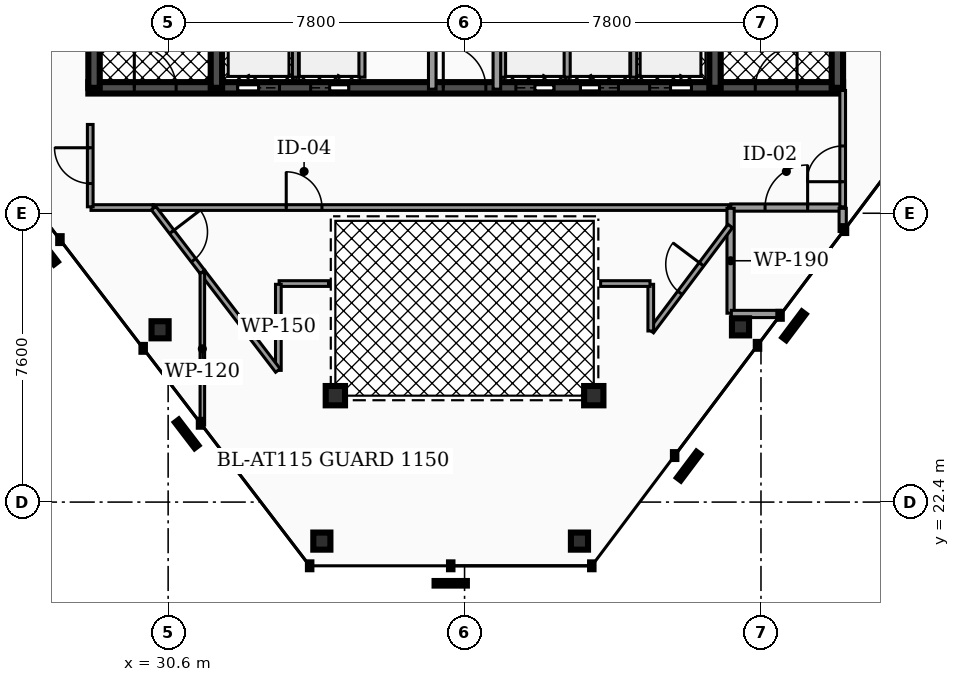
"""IFC4 building model, lengths in metres.
Left out: names, types, materials, properties, quantities, classifications, styles, units other than length and angle.
Written with IfcOpenShell. Run it as: python <this file> out.ifc"""

import sys

from ifc_helpers import new_model, si_unit, direction, frame, frame_2d, origin, origin_2d, place, context, subcontext, project, spatial, rectangle, hollow_rectangle, hollow_circle, extrude, element, fill, save


model = new_model("IFC4")
c1 = context("Model", 3, precision=1e-05, world=origin(), true_north=direction((0.0, 1.0)))
c2 = subcontext(c1, "Body", "Model", "MODEL_VIEW")
j1 = project(units=[si_unit("LENGTHUNIT", "METRE"), si_unit("PLANEANGLEUNIT", "RADIAN")], contexts=[c1])
p1 = place(None, origin())
s1 = spatial("IfcSite", under=j1, at=p1, CompositionType="ELEMENT")
p2 = place(p1, origin())
s2 = spatial("IfcBuilding", under=s1, at=p2, CompositionType="ELEMENT")
p3 = place(p2, frame((0.0, 0.0, 299.2)))
s3 = spatial("IfcBuildingStorey", under=s2, at=p3, CompositionType="ELEMENT", Elevation=299.2)
p4 = place(p3, frame((28.5, 33.3, 0.0), z_axis=(0.0, 0.0, 1.0), x_axis=(1.0, 0.0, 0.0)))
e1 = element("IfcWall", 1, at=p4, inside=s3, PredefinedType="SHEAR", context=c2, shape_type="SweptSolid", body=[
    extrude(rectangle(XDim=19.86, YDim=0.3, at=frame_2d((9.93, 0.0))), origin(), (0.0, 0.0, 1.0), 3.78),
])
p5 = place(p4, frame((3.93, 0.0, 0.0)))
e2 = element("IfcOpeningElement", 2, at=p5, cuts=e1, PredefinedType="OPENING", context=c2, shape_type="SweptSolid", body=[
    extrude(rectangle(XDim=1.1, YDim=2.15, at=frame_2d((0.55, 1.075))), frame((0.0, 0.16, 0.0), z_axis=(0.0, -1.0, 0.0), x_axis=(1.0, 0.0, 0.0)), (0.0, 0.0, 1.0), 0.32),
])
p6 = place(p4, frame((14.77, 0.0, 0.0)))
e3 = element("IfcOpeningElement", 3, at=p6, cuts=e1, PredefinedType="OPENING", context=c2, shape_type="SweptSolid", body=[
    extrude(rectangle(XDim=1.1, YDim=2.15, at=frame_2d((0.55, 1.075))), frame((0.0, 0.16, 0.0), z_axis=(0.0, -1.0, 0.0), x_axis=(1.0, 0.0, 0.0)), (0.0, 0.0, 1.0), 0.32),
])
p7 = place(p4, frame((11.25, 0.0, 0.0)))
e4 = element("IfcOpeningElement", 4, at=p7, cuts=e1, PredefinedType="OPENING", context=c2, shape_type="SweptSolid", body=[
    extrude(rectangle(XDim=1.0, YDim=2.1, at=frame_2d((0.5, 1.05))), frame((0.0, 0.16, 0.0), z_axis=(0.0, -1.0, 0.0), x_axis=(1.0, 0.0, 0.0)), (0.0, 0.0, 1.0), 0.32),
])
p8 = place(p4, frame((12.95, 0.0, 0.0)))
e5 = element("IfcOpeningElement", 5, at=p8, cuts=e1, PredefinedType="OPENING", context=c2, shape_type="SweptSolid", body=[
    extrude(rectangle(XDim=1.0, YDim=2.1, at=frame_2d((0.5, 1.05))), frame((0.0, 0.16, 0.0), z_axis=(0.0, -1.0, 0.0), x_axis=(1.0, 0.0, 0.0)), (0.0, 0.0, 1.0), 0.32),
])
p9 = place(p4, frame((5.85, 0.0, 0.0)))
e6 = element("IfcOpeningElement", 6, at=p9, cuts=e1, PredefinedType="OPENING", context=c2, shape_type="SweptSolid", body=[
    extrude(rectangle(XDim=1.0, YDim=2.1, at=frame_2d((0.5, 1.05))), frame((0.0, 0.16, 0.0), z_axis=(0.0, -1.0, 0.0), x_axis=(1.0, 0.0, 0.0)), (0.0, 0.0, 1.0), 0.32),
])
p10 = place(p4, frame((1.21, 0.0, 0.0)))
e7 = element("IfcOpeningElement", 7, at=p10, cuts=e1, PredefinedType="OPENING", context=c2, shape_type="SweptSolid", body=[
    extrude(rectangle(XDim=1.1, YDim=2.2, at=frame_2d((0.55, 1.1))), frame((0.0, 0.16, 0.0), z_axis=(0.0, -1.0, 0.0), x_axis=(1.0, 0.0, 0.0)), (0.0, 0.0, 1.0), 0.32),
])
p11 = place(p4, frame((9.34, 0.0, 0.0)))
e8 = element("IfcOpeningElement", 8, at=p11, cuts=e1, PredefinedType="OPENING", context=c2, shape_type="SweptSolid", body=[
    extrude(rectangle(XDim=1.12, YDim=2.05, at=frame_2d((0.56, 1.025))), frame((0.0, 0.16, 0.0), z_axis=(0.0, -1.0, 0.0), x_axis=(1.0, 0.0, 0.0)), (0.0, 0.0, 1.0), 0.32),
])
p12 = place(p4, frame((17.55, 0.0, 0.0)))
e9 = element("IfcOpeningElement", 9, at=p12, cuts=e1, PredefinedType="OPENING", context=c2, shape_type="SweptSolid", body=[
    extrude(rectangle(XDim=1.1, YDim=2.2, at=frame_2d((0.55, 1.1))), frame((0.0, 0.16, 0.0), z_axis=(0.0, -1.0, 0.0), x_axis=(1.0, 0.0, 0.0)), (0.0, 0.0, 1.0), 0.32),
])
for number, where, z_axis, x_axis in (
    (10, (28.65, 33.3, 0.0), (0.0, 0.0, 1.0), (0.0, 1.0, 0.0)),
    (11, (31.87, 33.3, 0.0), (0.0, 0.0, 1.0), (0.0, 1.0, 0.0)),
    (12, (44.99, 33.3, 0.0), (0.0, 0.0, 1.0), (0.0, 1.0, 0.0)),
    (13, (48.21, 33.3, 0.0), (0.0, 0.0, 1.0), (0.0, 1.0, 0.0)),
):
    element("IfcWall", number, at=place(p3, frame(where, z_axis=z_axis, x_axis=x_axis)), inside=s3, PredefinedType="SHEAR", context=c2, shape_type="SweptSolid", body=[
        extrude(rectangle(XDim=10.1, YDim=0.3, at=frame_2d((5.05, 0.0))), origin(), (0.0, 0.0, 1.0), 3.78),
    ])
for number, where, z_axis, x_axis in (
    (14, (30.388, 26.934, 0.0), (0.0, 0.0, 1.0), (1.0, 0.0, 0.0)),
    (15, (34.645, 21.373, 0.0), (0.0, 0.0, 1.0), (1.0, 0.0, 0.0)),
    (16, (41.424, 21.373, 0.0), (0.0, 0.0, 1.0), (1.0, 0.0, 0.0)),
    (17, (45.661, 27.011, 0.0), (0.0, 0.0, 1.0), (1.0, 0.0, 0.0)),
):
    element("IfcColumn", number, at=place(p3, frame(where, z_axis=z_axis, x_axis=x_axis)), inside=s3, PredefinedType="COLUMN", context=c2, shape_type="SweptSolid", body=[
        extrude(hollow_rectangle(XDim=0.45, YDim=0.45, WallThickness=0.022, at=origin_2d()), origin(), (0.0, 0.0, 1.0), 3.78),
    ])
for number, where, z_axis, x_axis in (
    (18, (35.0, 25.2, 0.0), (0.0, 0.0, 1.0), (1.0, 0.0, 0.0)),
    (19, (41.8, 25.2, 0.0), (0.0, 0.0, 1.0), (1.0, 0.0, 0.0)),
):
    element("IfcColumn", number, at=place(p3, frame(where, z_axis=z_axis, x_axis=x_axis)), inside=s3, PredefinedType="COLUMN", context=c2, shape_type="SweptSolid", body=[
        extrude(hollow_circle(Radius=0.254, WallThickness=0.02, at=origin_2d()), origin(), (0.0, 0.0, 1.0), 3.78),
    ])
for number, where, z_axis, x_axis in (
    (20, (33.95, 33.58, 0.0), (0.0, 0.0, 1.0), (0.0, 1.0, 0.0)),
    (21, (42.85, 33.58, 0.0), (0.0, 0.0, 1.0), (0.0, 1.0, 0.0)),
):
    element("IfcWall", number, at=place(p3, frame(where, z_axis=z_axis, x_axis=x_axis)), inside=s3, PredefinedType="SOLIDWALL", context=c2, shape_type="SweptSolid", body=[
        extrude(rectangle(XDim=2.45, YDim=0.16, at=frame_2d((1.225, 0.0))), origin(), (0.0, 0.0, 1.0), 2.85),
    ])
for number, where, z_axis, x_axis in (
    (22, (39.4, 33.58, 0.0), (0.0, 0.0, 1.0), (0.0, 1.0, 0.0)),
    (23, (41.1, 33.58, 0.0), (0.0, 0.0, 1.0), (0.0, 1.0, 0.0)),
    (24, (35.7, 33.58, 0.0), (0.0, 0.0, 1.0), (0.0, 1.0, 0.0)),
):
    element("IfcWall", number, at=place(p3, frame(where, z_axis=z_axis, x_axis=x_axis)), inside=s3, PredefinedType="SOLIDWALL", context=c2, shape_type="SweptSolid", body=[
        extrude(rectangle(XDim=2.25, YDim=0.16, at=frame_2d((1.125, 0.0))), origin(), (0.0, 0.0, 1.0), 2.85),
    ])
p13 = place(p3, frame((37.55, 33.265, 0.0), z_axis=(0.0, 0.0, 1.0), x_axis=(0.0, 1.0, 0.0)))
e25 = element("IfcWall", 25, at=p13, inside=s3, PredefinedType="PARTITIONING", context=c2, shape_type="SweptSolid", body=[
    extrude(rectangle(XDim=3.615, YDim=0.2, at=frame_2d((1.808, 0.0))), origin(), (0.0, 0.0, 1.0), 2.835),
])
p14 = place(p13, frame((1.367, 0.0, 0.0)))
e26 = element("IfcOpeningElement", 26, at=p14, cuts=e25, PredefinedType="OPENING", context=c2, shape_type="SweptSolid", body=[
    extrude(rectangle(XDim=0.88, YDim=2.05, at=frame_2d((0.44, 1.025))), frame((0.0, 0.11, 0.0), z_axis=(0.0, -1.0, 0.0), x_axis=(1.0, 0.0, 0.0)), (0.0, 0.0, 1.0), 0.22),
])
p15 = place(p3, frame((39.25, 33.265, 0.0), z_axis=(0.0, 0.0, 1.0), x_axis=(0.0, 1.0, 0.0)))
e27 = element("IfcWall", 27, at=p15, inside=s3, PredefinedType="PARTITIONING", context=c2, shape_type="SweptSolid", body=[
    extrude(rectangle(XDim=3.615, YDim=0.2, at=frame_2d((1.808, 0.0))), origin(), (0.0, 0.0, 1.0), 2.835),
])
p16 = place(p3, frame((45.405, 30.15, 0.0), z_axis=(0.0, 0.0, 1.0), x_axis=(1.0, 0.0, 0.0)))
e28 = element("IfcWall", 28, at=p16, inside=s3, PredefinedType="PARTITIONING", context=c2, shape_type="SweptSolid", body=[
    extrude(rectangle(XDim=2.925, YDim=0.19, at=frame_2d((1.462, 0.0))), origin(), (0.0, 0.0, 1.0), 2.835),
])
p17 = place(p16, frame((0.903, 0.0, 0.0)))
e29 = element("IfcOpeningElement", 29, at=p17, cuts=e28, PredefinedType="OPENING", context=c2, shape_type="SweptSolid", body=[
    extrude(rectangle(XDim=1.12, YDim=2.05, at=frame_2d((0.56, 1.025))), frame((0.0, 0.105, 0.0), z_axis=(0.0, -1.0, 0.0), x_axis=(1.0, 0.0, 0.0)), (0.0, 0.0, 1.0), 0.21),
])
p18 = place(p3, frame((30.21, 30.15, 0.0), z_axis=(0.0, 0.0, 1.0), x_axis=(1.0, 0.0, 0.0)))
e30 = element("IfcWall", 30, at=p18, inside=s3, PredefinedType="PARTITIONING", context=c2, shape_type="SweptSolid", body=[
    extrude(rectangle(XDim=15.135, YDim=0.15, at=frame_2d((7.568, 0.0))), origin(), (0.0, 0.0, 1.0), 2.835),
])
p19 = place(p18, frame((3.498, 0.0, 0.0)))
e31 = element("IfcOpeningElement", 31, at=p19, cuts=e30, PredefinedType="OPENING", context=c2, shape_type="SweptSolid", body=[
    extrude(rectangle(XDim=0.94, YDim=2.05, at=frame_2d((0.47, 1.025))), frame((0.0, 0.085, 0.0), z_axis=(0.0, -1.0, 0.0), x_axis=(1.0, 0.0, 0.0)), (0.0, 0.0, 1.0), 0.17),
])
p20 = place(p3, frame((28.57, 30.15, 0.0), z_axis=(0.0, 0.0, 1.0), x_axis=(1.0, 0.0, 0.0)))
e32 = element("IfcWall", 32, at=p20, inside=s3, PredefinedType="PARTITIONING", context=c2, shape_type="SweptSolid", body=[
    extrude(rectangle(XDim=1.634, YDim=0.15, at=frame_2d((0.817, 0.0))), origin(), (0.0, 0.0, 1.0), 2.835),
])
p21 = place(p3, frame((28.55, 30.17, 0.0), z_axis=(0.0, 0.0, 1.0), x_axis=(0.0, 1.0, 0.0)))
e33 = element("IfcWall", 33, at=p21, inside=s3, PredefinedType="PARTITIONING", context=c2, shape_type="SweptSolid", body=[
    extrude(rectangle(XDim=2.166, YDim=0.15, at=frame_2d((1.083, 0.0))), origin(), (0.0, 0.0, 1.0), 2.835),
])
p22 = place(p21, frame((0.613, 0.0, 0.0)))
e34 = element("IfcOpeningElement", 34, at=p22, cuts=e33, PredefinedType="OPENING", context=c2, shape_type="SweptSolid", body=[
    extrude(rectangle(XDim=0.94, YDim=2.05, at=frame_2d((0.47, 1.025))), frame((0.0, 0.085, 0.0), z_axis=(0.0, -1.0, 0.0), x_axis=(1.0, 0.0, 0.0)), (0.0, 0.0, 1.0), 0.17),
])
p23 = place(p3, frame((48.35, 30.17, 0.0), z_axis=(0.0, 0.0, 1.0), x_axis=(0.0, 1.0, 0.0)))
e35 = element("IfcWall", 35, at=p23, inside=s3, PredefinedType="PARTITIONING", context=c2, shape_type="SweptSolid", body=[
    extrude(rectangle(XDim=3.06, YDim=0.15, at=frame_2d((1.53, 0.0))), origin(), (0.0, 0.0, 1.0), 2.835),
])
p24 = place(p23, frame((0.66, 0.0, 0.0)))
e36 = element("IfcOpeningElement", 36, at=p24, cuts=e35, PredefinedType="OPENING", context=c2, shape_type="SweptSolid", body=[
    extrude(rectangle(XDim=0.94, YDim=2.05, at=frame_2d((0.47, 1.025))), frame((0.0, 0.085, 0.0), z_axis=(0.0, -1.0, 0.0), x_axis=(1.0, 0.0, 0.0)), (0.0, 0.0, 1.0), 0.17),
])
p25 = place(p3, frame((45.4, 27.37, 0.0), z_axis=(0.0, 0.0, 1.0), x_axis=(0.0, 1.0, 0.0)))
e37 = element("IfcWall", 37, at=p25, inside=s3, PredefinedType="PARTITIONING", context=c2, shape_type="SweptSolid", body=[
    extrude(rectangle(XDim=2.76, YDim=0.19, at=frame_2d((1.38, 0.0))), origin(), (0.0, 0.0, 1.0), 2.835),
])
p26 = place(p3, frame((45.42, 27.35, 0.0), z_axis=(0.0, 0.0, 1.0), x_axis=(1.0, 0.0, 0.0)))
e38 = element("IfcWall", 38, at=p26, inside=s3, PredefinedType="PARTITIONING", context=c2, shape_type="SweptSolid", body=[
    extrude(rectangle(XDim=1.294, YDim=0.19, at=frame_2d((0.647, 0.0))), origin(), (0.0, 0.0, 1.0), 2.835),
])
p27 = place(p3, frame((48.35, 29.521, 0.0), z_axis=(0.0, 0.0, 1.0), x_axis=(0.0, 1.0, 0.0)))
e39 = element("IfcWall", 39, at=p27, inside=s3, PredefinedType="PARTITIONING", context=c2, shape_type="SweptSolid", body=[
    extrude(rectangle(XDim=0.609, YDim=0.19, at=frame_2d((0.304, 0.0))), origin(), (0.0, 0.0, 1.0), 2.835),
])
p28 = place(p3, frame((43.312, 26.898, 0.0), z_axis=(0.0, 0.0, 1.0), x_axis=(0.600868916001, 0.799347575079, 0.0)))
e40 = element("IfcWall", 40, at=p28, inside=s3, PredefinedType="PARTITIONING", context=c2, shape_type="SweptSolid", body=[
    extrude(rectangle(XDim=3.46, YDim=0.15, at=frame_2d((1.73, 0.0))), origin(), (0.0, 0.0, 1.0), 2.835),
])
p29 = place(p28, frame((1.26, 0.0, 0.0)))
e41 = element("IfcOpeningElement", 41, at=p29, cuts=e40, PredefinedType="OPENING", context=c2, shape_type="SweptSolid", body=[
    extrude(rectangle(XDim=0.94, YDim=2.05, at=frame_2d((0.47, 1.025))), frame((0.0, 0.085, 0.0), z_axis=(0.0, -1.0, 0.0), x_axis=(1.0, 0.0, 0.0)), (0.0, 0.0, 1.0), 0.17),
])
p30 = place(p3, frame((43.3, 26.902, 0.0), z_axis=(0.0, 0.0, 1.0), x_axis=(0.0, 1.0, 0.0)))
e42 = element("IfcWall", 42, at=p30, inside=s3, PredefinedType="PARTITIONING", context=c2, shape_type="SweptSolid", body=[
    extrude(rectangle(XDim=1.228, YDim=0.15, at=frame_2d((0.614, 0.0))), origin(), (0.0, 0.0, 1.0), 2.835),
])
for number, where, z_axis, x_axis in (
    (43, (41.98, 28.15, 0.0), (0.0, 0.0, 1.0), (1.0, 0.0, 0.0)),
    (44, (33.52, 28.15, 0.0), (0.0, 0.0, 1.0), (1.0, 0.0, 0.0)),
):
    element("IfcWall", number, at=place(p3, frame(where, z_axis=z_axis, x_axis=x_axis)), inside=s3, PredefinedType="PARTITIONING", context=c2, shape_type="SweptSolid", body=[
        extrude(rectangle(XDim=1.3, YDim=0.15, at=frame_2d((0.65, 0.0))), origin(), (0.0, 0.0, 1.0), 2.835),
    ])
p31 = place(p3, frame((33.5, 25.866, 0.0), z_axis=(0.0, 0.0, 1.0), x_axis=(0.0, 1.0, 0.0)))
e45 = element("IfcWall", 45, at=p31, inside=s3, PredefinedType="PARTITIONING", context=c2, shape_type="SweptSolid", body=[
    extrude(rectangle(XDim=2.264, YDim=0.15, at=frame_2d((1.132, 0.0))), origin(), (0.0, 0.0, 1.0), 2.835),
])
p32 = place(p3, frame((31.503, 28.454, 0.0), z_axis=(0.0, 0.0, 1.0), x_axis=(0.607891349871, -0.7940202181, 0.0)))
e46 = element("IfcWall", 46, at=p32, inside=s3, PredefinedType="PARTITIONING", context=c2, shape_type="SweptSolid", body=[
    extrude(rectangle(XDim=3.265, YDim=0.15, at=frame_2d((1.632, 0.0))), origin(), (0.0, 0.0, 1.0), 2.835),
])
p33 = place(p3, frame((30.217, 30.134, 0.0), z_axis=(0.0, 0.0, 1.0), x_axis=(0.607857058986, -0.794046469572, 0.0)))
e47 = element("IfcWall", 47, at=p33, inside=s3, PredefinedType="PARTITIONING", context=c2, shape_type="SweptSolid", body=[
    extrude(rectangle(XDim=2.115, YDim=0.15, at=frame_2d((1.058, 0.0))), origin(), (0.0, 0.0, 1.0), 2.835),
])
p34 = place(p33, frame((0.788, 0.0, 0.0)))
e48 = element("IfcOpeningElement", 48, at=p34, cuts=e47, PredefinedType="OPENING", context=c2, shape_type="SweptSolid", body=[
    extrude(rectangle(XDim=0.94, YDim=2.05, at=frame_2d((0.47, 1.025))), frame((0.0, 0.085, 0.0), z_axis=(0.0, -1.0, 0.0), x_axis=(1.0, 0.0, 0.0)), (0.0, 0.0, 1.0), 0.17),
])
p35 = place(p3, frame((31.5, 24.427, 0.0), z_axis=(0.0, 0.0, 1.0), x_axis=(0.0, 1.0, 0.0)))
e49 = element("IfcWall", 49, at=p35, inside=s3, PredefinedType="PARTITIONING", context=c2, shape_type="SweptSolid", body=[
    extrude(rectangle(XDim=4.012, YDim=0.12, at=frame_2d((2.006, 0.0))), origin(), (0.0, 0.0, 1.0), 2.835),
])
p36 = place(p2, frame((0.0, 0.0, 303.28)))
p37 = place(p36, frame((0.0, 0.0, -0.3)))
p38 = place(p37, frame((35.2, 30.8, 0.0)))
p39 = place(p38, frame((0.0, 0.0, 0.25)))
e50 = element("IfcWindow", 50, at=p39, inside=s3, PartitioningType="SINGLE_PANEL", PredefinedType="SKYLIGHT", context=c2, shape_type="SweptSolid", body=[
    extrude(rectangle(XDim=2.4, YDim=2.4, at=origin_2d()), origin(), (0.0, 0.0, 1.0), 0.05),
])
p40 = place(p37, frame((41.6, 30.8, 0.0)))
p41 = place(p40, frame((0.0, 0.0, 0.25)))
e51 = element("IfcWindow", 51, at=p41, inside=s3, PartitioningType="SINGLE_PANEL", PredefinedType="SKYLIGHT", context=c2, shape_type="SweptSolid", body=[
    extrude(rectangle(XDim=2.4, YDim=2.4, at=origin_2d()), origin(), (0.0, 0.0, 1.0), 0.05),
])
p42 = place(p37, frame((38.4, 30.8, 0.0)))
p43 = place(p42, frame((0.0, 0.0, 0.25)))
e52 = element("IfcWindow", 52, at=p43, inside=s3, PartitioningType="SINGLE_PANEL", PredefinedType="SKYLIGHT", context=c2, shape_type="SweptSolid", body=[
    extrude(rectangle(XDim=1.8, YDim=2.2, at=origin_2d()), origin(), (0.0, 0.0, 1.0), 0.05),
])
p44 = place(p5, origin())
e53 = element("IfcDoor", 53, at=p44, inside=s3, OperationType="SLIDING_TO_LEFT", PredefinedType="DOOR", context=c2, shape_type="SweptSolid", body=[
    extrude(rectangle(XDim=1.1, YDim=2.15, at=frame_2d((0.55, 1.075))), frame((0.0, 0.025, 0.0), z_axis=(0.0, -1.0, 0.0), x_axis=(1.0, 0.0, 0.0)), (0.0, 0.0, 1.0), 0.05),
])
fill(e2, e53)
p45 = place(p6, origin())
e54 = element("IfcDoor", 54, at=p45, inside=s3, OperationType="SLIDING_TO_RIGHT", PredefinedType="DOOR", context=c2, shape_type="SweptSolid", body=[
    extrude(rectangle(XDim=1.1, YDim=2.15, at=frame_2d((0.55, 1.075))), frame((0.0, 0.025, 0.0), z_axis=(0.0, -1.0, 0.0), x_axis=(1.0, 0.0, 0.0)), (0.0, 0.0, 1.0), 0.05),
])
fill(e3, e54)
p46 = place(p7, origin())
e55 = element("IfcDoor", 55, at=p46, inside=s3, OperationType="SLIDING_TO_RIGHT", PredefinedType="DOOR", context=c2, shape_type="SweptSolid", body=[
    extrude(rectangle(XDim=1.0, YDim=2.1, at=frame_2d((0.5, 1.05))), frame((0.0, 0.025, 0.0), z_axis=(0.0, -1.0, 0.0), x_axis=(1.0, 0.0, 0.0)), (0.0, 0.0, 1.0), 0.05),
])
fill(e4, e55)
p47 = place(p8, origin())
e56 = element("IfcDoor", 56, at=p47, inside=s3, OperationType="SLIDING_TO_LEFT", PredefinedType="DOOR", context=c2, shape_type="SweptSolid", body=[
    extrude(rectangle(XDim=1.0, YDim=2.1, at=frame_2d((0.5, 1.05))), frame((0.0, 0.025, 0.0), z_axis=(0.0, -1.0, 0.0), x_axis=(1.0, 0.0, 0.0)), (0.0, 0.0, 1.0), 0.05),
])
fill(e5, e56)
p48 = place(p9, origin())
e57 = element("IfcDoor", 57, at=p48, inside=s3, OperationType="SLIDING_TO_RIGHT", PredefinedType="DOOR", context=c2, shape_type="SweptSolid", body=[
    extrude(rectangle(XDim=1.0, YDim=2.1, at=frame_2d((0.5, 1.05))), frame((0.0, 0.025, 0.0), z_axis=(0.0, -1.0, 0.0), x_axis=(1.0, 0.0, 0.0)), (0.0, 0.0, 1.0), 0.05),
])
fill(e6, e57)
p49 = place(p10, origin())
e58 = element("IfcDoor", 58, at=p49, inside=s3, OperationType="SINGLE_SWING_LEFT", PredefinedType="DOOR", context=c2, shape_type="SweptSolid", body=[
    extrude(rectangle(XDim=1.1, YDim=2.2, at=frame_2d((0.55, 1.1))), frame((0.0, 0.025, 0.0), z_axis=(0.0, -1.0, 0.0), x_axis=(1.0, 0.0, 0.0)), (0.0, 0.0, 1.0), 0.05),
])
fill(e7, e58)
p50 = place(p11, origin())
e59 = element("IfcDoor", 59, at=p50, inside=s3, OperationType="SINGLE_SWING_LEFT", PredefinedType="DOOR", context=c2, shape_type="SweptSolid", body=[
    extrude(rectangle(XDim=1.12, YDim=2.05, at=frame_2d((0.56, 1.025))), frame((0.0, 0.025, 0.0), z_axis=(0.0, -1.0, 0.0), x_axis=(1.0, 0.0, 0.0)), (0.0, 0.0, 1.0), 0.05),
])
fill(e8, e59)
p51 = place(p12, origin())
e60 = element("IfcDoor", 60, at=p51, inside=s3, OperationType="SINGLE_SWING_RIGHT", PredefinedType="DOOR", context=c2, shape_type="SweptSolid", body=[
    extrude(rectangle(XDim=1.1, YDim=2.2, at=frame_2d((0.55, 1.1))), frame((0.0, 0.025, 0.0), z_axis=(0.0, -1.0, 0.0), x_axis=(1.0, 0.0, 0.0)), (0.0, 0.0, 1.0), 0.05),
])
fill(e9, e60)
p52 = place(p17, origin())
e61 = element("IfcDoor", 61, at=p52, inside=s3, OperationType="SINGLE_SWING_RIGHT", PredefinedType="DOOR", context=c2, shape_type="SweptSolid", body=[
    extrude(rectangle(XDim=1.12, YDim=2.05, at=frame_2d((0.56, 1.025))), frame((0.0, 0.025, 0.0), z_axis=(0.0, -1.0, 0.0), x_axis=(1.0, 0.0, 0.0)), (0.0, 0.0, 1.0), 0.05),
])
fill(e29, e61)
p53 = place(p19, origin())
e62 = element("IfcDoor", 62, at=p53, inside=s3, OperationType="SINGLE_SWING_LEFT", PredefinedType="DOOR", context=c2, shape_type="SweptSolid", body=[
    extrude(rectangle(XDim=0.94, YDim=2.05, at=frame_2d((0.47, 1.025))), frame((0.0, 0.025, 0.0), z_axis=(0.0, -1.0, 0.0), x_axis=(1.0, 0.0, 0.0)), (0.0, 0.0, 1.0), 0.05),
])
fill(e31, e62)
p54 = place(p22, origin())
e63 = element("IfcDoor", 63, at=p54, inside=s3, OperationType="SINGLE_SWING_RIGHT", PredefinedType="DOOR", context=c2, shape_type="SweptSolid", body=[
    extrude(rectangle(XDim=0.94, YDim=2.05, at=frame_2d((0.47, 1.025))), frame((0.0, 0.025, 0.0), z_axis=(0.0, -1.0, 0.0), x_axis=(1.0, 0.0, 0.0)), (0.0, 0.0, 1.0), 0.05),
])
fill(e34, e63)
p55 = place(p24, origin())
e64 = element("IfcDoor", 64, at=p55, inside=s3, OperationType="SINGLE_SWING_LEFT", PredefinedType="DOOR", context=c2, shape_type="SweptSolid", body=[
    extrude(rectangle(XDim=0.94, YDim=2.05, at=frame_2d((0.47, 1.025))), frame((0.0, 0.025, 0.0), z_axis=(0.0, -1.0, 0.0), x_axis=(1.0, 0.0, 0.0)), (0.0, 0.0, 1.0), 0.05),
])
fill(e36, e64)
p56 = place(p29, origin())
e65 = element("IfcDoor", 65, at=p56, inside=s3, OperationType="SINGLE_SWING_RIGHT", PredefinedType="DOOR", context=c2, shape_type="SweptSolid", body=[
    extrude(rectangle(XDim=0.94, YDim=2.05, at=frame_2d((0.47, 1.025))), frame((0.0, 0.025, 0.0), z_axis=(0.0, -1.0, 0.0), x_axis=(1.0, 0.0, 0.0)), (0.0, 0.0, 1.0), 0.05),
])
fill(e41, e65)
p57 = place(p34, origin())
e66 = element("IfcDoor", 66, at=p57, inside=s3, OperationType="SINGLE_SWING_LEFT", PredefinedType="DOOR", context=c2, shape_type="SweptSolid", body=[
    extrude(rectangle(XDim=0.94, YDim=2.05, at=frame_2d((0.47, 1.025))), frame((0.0, 0.025, 0.0), z_axis=(0.0, -1.0, 0.0), x_axis=(1.0, 0.0, 0.0)), (0.0, 0.0, 1.0), 0.05),
])
fill(e48, e66)
save(model, sys.argv[1])
